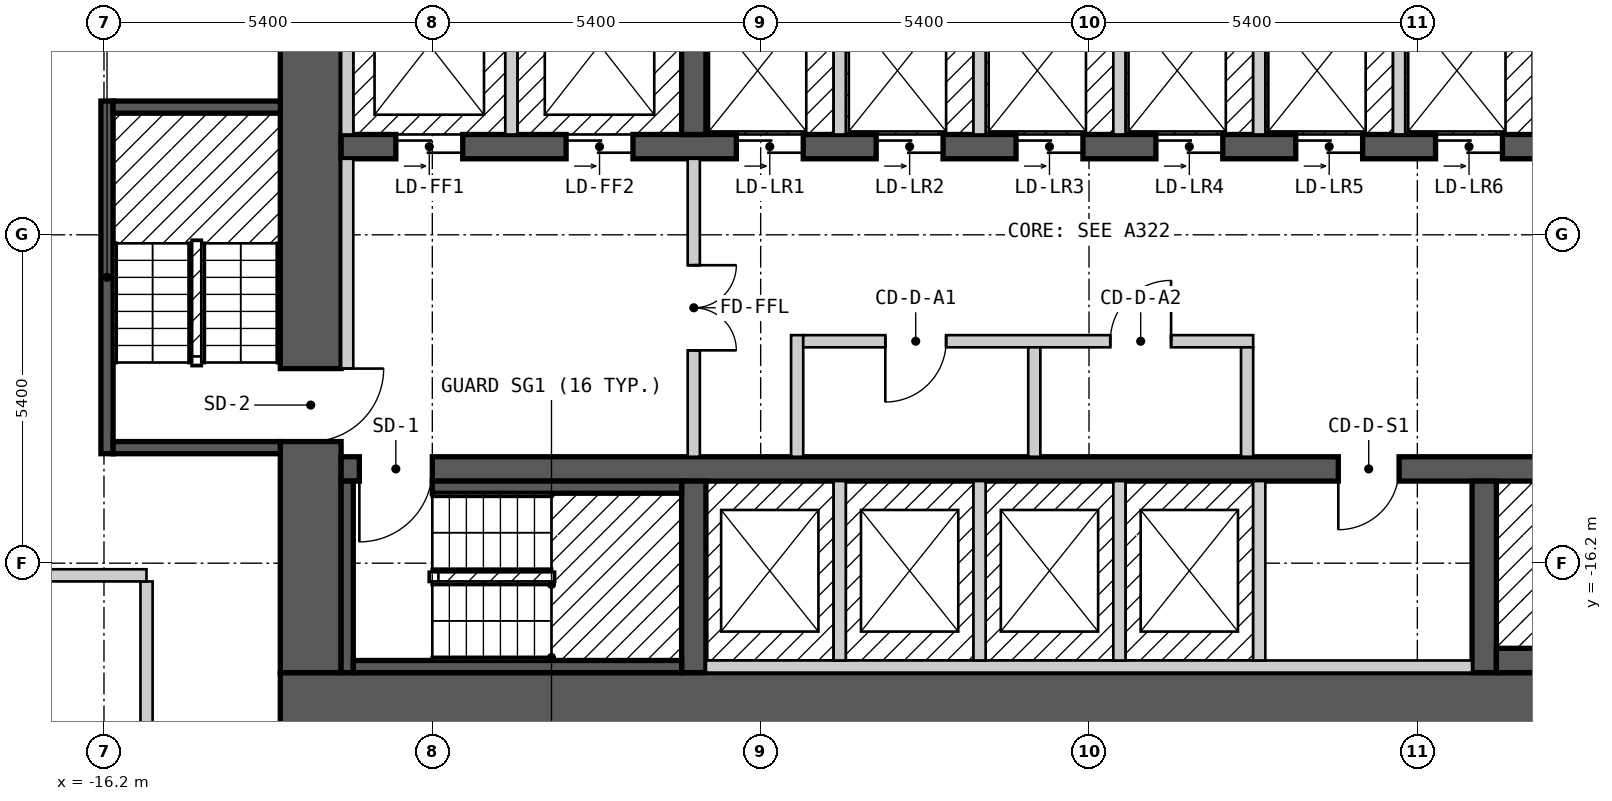
"""IFC4 building model, lengths in metres.
Left out: names, types, materials, properties, quantities, classifications, styles, units other than length and angle.
Written with IfcOpenShell. Run it as: python <this file> out.ifc"""

import sys

from ifc_helpers import new_model, si_unit, direction, frame, frame_2d, origin, place, context, subcontext, project, spatial, rectangle, extrude, element, fill, save


model = new_model("IFC4")
c1 = context("Model", 3, precision=1e-05, world=origin(), true_north=direction((0.0, 1.0)))
c2 = subcontext(c1, "Body", "Model", "MODEL_VIEW")
j1 = project(units=[si_unit("LENGTHUNIT", "METRE"), si_unit("PLANEANGLEUNIT", "RADIAN")], contexts=[c1])
p1 = place(None, origin())
s1 = spatial("IfcSite", under=j1, at=p1, CompositionType="ELEMENT")
p2 = place(p1, origin())
s2 = spatial("IfcBuilding", under=s1, at=p2, CompositionType="ELEMENT")
p3 = place(p2, frame((0.0, 0.0, 72.0)))
s3 = spatial("IfcBuildingStorey", under=s2, at=p3, CompositionType="ELEMENT", Elevation=72.0)
p4 = place(p3, frame((-13.3, -18.5, 0.0), z_axis=(0.0, 0.0, 1.0), x_axis=(1.0, 0.0, 0.0)))
e1 = element("IfcWall", 1, at=p4, inside=s3, PredefinedType="SHEAR", context=c2, shape_type="SweptSolid", body=[
    extrude(rectangle(XDim=26.6, YDim=1.0, at=frame_2d((13.3, 0.0))), origin(), (0.0, 0.0, 1.0), 2.7),
])
p5 = place(p3, frame((-12.8, -18.0, 0.0), z_axis=(0.0, 0.0, 1.0), x_axis=(0.0, 1.0, 0.0)))
e2 = element("IfcWall", 2, at=p5, inside=s3, PredefinedType="SHEAR", context=c2, shape_type="SweptSolid", body=[
    extrude(rectangle(XDim=12.0, YDim=1.0, at=frame_2d((6.0, 0.0))), origin(), (0.0, 0.0, 1.0), 2.7),
])
p6 = place(p5, frame((3.8, 0.0, 0.0)))
e3 = element("IfcOpeningElement", 3, at=p6, cuts=e2, PredefinedType="OPENING", context=c2, shape_type="SweptSolid", body=[
    extrude(rectangle(XDim=1.2, YDim=2.1, at=frame_2d((0.6, 1.05))), frame((0.0, 0.51, 0.0), z_axis=(0.0, -1.0, 0.0), x_axis=(1.0, 0.0, 0.0)), (0.0, 0.0, 1.0), 1.02),
])
p7 = place(p3, frame((-12.3, -14.65, 0.0), z_axis=(0.0, 0.0, 1.0), x_axis=(1.0, 0.0, 0.0)))
e4 = element("IfcWall", 4, at=p7, inside=s3, PredefinedType="SHEAR", context=c2, shape_type="SweptSolid", body=[
    extrude(rectangle(XDim=24.6, YDim=0.4, at=frame_2d((12.3, 0.0))), origin(), (0.0, 0.0, 1.0), 2.7),
])
p8 = place(p7, frame((1.5, 0.0, 0.0), z_axis=(0.0, 0.0, 1.0), x_axis=(-1.0, 0.0, 0.0)))
e5 = element("IfcOpeningElement", 5, at=p8, cuts=e4, PredefinedType="OPENING", context=c2, shape_type="SweptSolid", body=[
    extrude(rectangle(XDim=1.2, YDim=2.1, at=frame_2d((0.6, 1.05))), frame((0.0, 0.21, 0.0), z_axis=(0.0, -1.0, 0.0), x_axis=(1.0, 0.0, 0.0)), (0.0, 0.0, 1.0), 0.42),
])
p9 = place(p7, frame((24.35, 0.0, 0.0), z_axis=(0.0, 0.0, 1.0), x_axis=(-1.0, 0.0, 0.0)))
e6 = element("IfcOpeningElement", 6, at=p9, cuts=e4, PredefinedType="OPENING", context=c2, shape_type="SweptSolid", body=[
    extrude(rectangle(XDim=1.2, YDim=2.1, at=frame_2d((0.6, 1.05))), frame((0.0, 0.21, 0.0), z_axis=(0.0, -1.0, 0.0), x_axis=(1.0, 0.0, 0.0)), (0.0, 0.0, 1.0), 0.42),
])
p10 = place(p7, frame((17.4, 0.0, 0.0), z_axis=(0.0, 0.0, 1.0), x_axis=(-1.0, 0.0, 0.0)))
e7 = element("IfcOpeningElement", 7, at=p10, cuts=e4, PredefinedType="OPENING", context=c2, shape_type="SweptSolid", body=[
    extrude(rectangle(XDim=1.0, YDim=2.1, at=frame_2d((0.5, 1.05))), frame((0.0, 0.21, 0.0), z_axis=(0.0, -1.0, 0.0), x_axis=(1.0, 0.0, 0.0)), (0.0, 0.0, 1.0), 0.42),
])
p11 = place(p3, frame((-12.3, -9.35, 0.0), z_axis=(0.0, 0.0, 1.0), x_axis=(1.0, 0.0, 0.0)))
e8 = element("IfcWall", 8, at=p11, inside=s3, PredefinedType="SHEAR", context=c2, shape_type="SweptSolid", body=[
    extrude(rectangle(XDim=22.5, YDim=0.4, at=frame_2d((11.25, 0.0))), origin(), (0.0, 0.0, 1.0), 2.7),
])
p12 = place(p11, frame((0.9, 0.0, 0.0)))
e9 = element("IfcOpeningElement", 9, at=p12, cuts=e8, PredefinedType="OPENING", context=c2, shape_type="SweptSolid", body=[
    extrude(rectangle(XDim=1.1, YDim=2.1, at=frame_2d((0.55, 1.05))), frame((0.0, 0.21, 0.0), z_axis=(0.0, -1.0, 0.0), x_axis=(1.0, 0.0, 0.0)), (0.0, 0.0, 1.0), 0.42),
])
p13 = place(p11, frame((3.7, 0.0, 0.0)))
e10 = element("IfcOpeningElement", 10, at=p13, cuts=e8, PredefinedType="OPENING", context=c2, shape_type="SweptSolid", body=[
    extrude(rectangle(XDim=1.1, YDim=2.1, at=frame_2d((0.55, 1.05))), frame((0.0, 0.21, 0.0), z_axis=(0.0, -1.0, 0.0), x_axis=(1.0, 0.0, 0.0)), (0.0, 0.0, 1.0), 0.42),
])
p14 = place(p11, frame((6.5, 0.0, 0.0)))
e11 = element("IfcOpeningElement", 11, at=p14, cuts=e8, PredefinedType="OPENING", context=c2, shape_type="SweptSolid", body=[
    extrude(rectangle(XDim=1.1, YDim=2.1, at=frame_2d((0.55, 1.05))), frame((0.0, 0.21, 0.0), z_axis=(0.0, -1.0, 0.0), x_axis=(1.0, 0.0, 0.0)), (0.0, 0.0, 1.0), 0.42),
])
p15 = place(p11, frame((8.8, 0.0, 0.0)))
e12 = element("IfcOpeningElement", 12, at=p15, cuts=e8, PredefinedType="OPENING", context=c2, shape_type="SweptSolid", body=[
    extrude(rectangle(XDim=1.1, YDim=2.1, at=frame_2d((0.55, 1.05))), frame((0.0, 0.21, 0.0), z_axis=(0.0, -1.0, 0.0), x_axis=(1.0, 0.0, 0.0)), (0.0, 0.0, 1.0), 0.42),
])
p16 = place(p11, frame((11.1, 0.0, 0.0)))
e13 = element("IfcOpeningElement", 13, at=p16, cuts=e8, PredefinedType="OPENING", context=c2, shape_type="SweptSolid", body=[
    extrude(rectangle(XDim=1.1, YDim=2.1, at=frame_2d((0.55, 1.05))), frame((0.0, 0.21, 0.0), z_axis=(0.0, -1.0, 0.0), x_axis=(1.0, 0.0, 0.0)), (0.0, 0.0, 1.0), 0.42),
])
p17 = place(p11, frame((13.4, 0.0, 0.0)))
e14 = element("IfcOpeningElement", 14, at=p17, cuts=e8, PredefinedType="OPENING", context=c2, shape_type="SweptSolid", body=[
    extrude(rectangle(XDim=1.1, YDim=2.1, at=frame_2d((0.55, 1.05))), frame((0.0, 0.21, 0.0), z_axis=(0.0, -1.0, 0.0), x_axis=(1.0, 0.0, 0.0)), (0.0, 0.0, 1.0), 0.42),
])
p18 = place(p11, frame((15.7, 0.0, 0.0)))
e15 = element("IfcOpeningElement", 15, at=p18, cuts=e8, PredefinedType="OPENING", context=c2, shape_type="SweptSolid", body=[
    extrude(rectangle(XDim=1.1, YDim=2.1, at=frame_2d((0.55, 1.05))), frame((0.0, 0.21, 0.0), z_axis=(0.0, -1.0, 0.0), x_axis=(1.0, 0.0, 0.0)), (0.0, 0.0, 1.0), 0.42),
])
p19 = place(p11, frame((18.0, 0.0, 0.0)))
e16 = element("IfcOpeningElement", 16, at=p19, cuts=e8, PredefinedType="OPENING", context=c2, shape_type="SweptSolid", body=[
    extrude(rectangle(XDim=1.1, YDim=2.1, at=frame_2d((0.55, 1.05))), frame((0.0, 0.21, 0.0), z_axis=(0.0, -1.0, 0.0), x_axis=(1.0, 0.0, 0.0)), (0.0, 0.0, 1.0), 0.42),
])
p20 = place(p11, frame((20.4, 0.0, 0.0)))
e17 = element("IfcOpeningElement", 17, at=p20, cuts=e8, PredefinedType="OPENING", context=c2, shape_type="SweptSolid", body=[
    extrude(rectangle(XDim=1.1, YDim=2.1, at=frame_2d((0.55, 1.05))), frame((0.0, 0.21, 0.0), z_axis=(0.0, -1.0, 0.0), x_axis=(1.0, 0.0, 0.0)), (0.0, 0.0, 1.0), 0.42),
])
for number, where, z_axis, x_axis in (
    (18, (-6.5, -18.0, 0.0), (0.0, 0.0, 1.0), (0.0, 1.0, 0.0)),
    (19, (6.5, -18.0, 0.0), (0.0, 0.0, 1.0), (0.0, 1.0, 0.0)),
    (20, (-6.5, -9.15, 0.0), (0.0, 0.0, 1.0), (0.0, 1.0, 0.0)),
):
    element("IfcWall", number, at=place(p3, frame(where, z_axis=z_axis, x_axis=x_axis)), inside=s3, PredefinedType="SHEAR", context=c2, shape_type="SweptSolid", body=[
        extrude(rectangle(XDim=3.15, YDim=0.4, at=frame_2d((1.575, 0.0))), origin(), (0.0, 0.0, 1.0), 2.7),
    ])
p21 = place(p3, frame((-15.5, -16.501, 0.0), z_axis=(0.0, 0.0, 1.0), x_axis=(0.0, -1.0, 0.0)))
e21 = element("IfcWall", 21, at=p21, inside=s3, PredefinedType="PARTITIONING", context=c2, shape_type="SweptSolid", body=[
    extrude(rectangle(XDim=4.598, YDim=0.2, at=frame_2d((2.299, 0.0))), origin(), (0.0, 0.0, 1.0), 2.7),
])
p22 = place(p3, frame((-18.249, -16.4, 0.0), z_axis=(0.0, 0.0, 1.0), x_axis=(1.0, 0.0, 0.0)))
e22 = element("IfcWall", 22, at=p22, inside=s3, PredefinedType="PARTITIONING", context=c2, shape_type="SweptSolid", body=[
    extrude(rectangle(XDim=2.748, YDim=0.2, at=frame_2d((1.374, 0.0))), origin(), (0.0, 0.0, 1.0), 2.7),
])
p23 = place(p3, frame((-16.15, -14.4, 0.0), z_axis=(0.0, 0.0, 1.0), x_axis=(0.0, 1.0, 0.0)))
e23 = element("IfcWall", 23, at=p23, inside=s3, PredefinedType="SOLIDWALL", context=c2, shape_type="SweptSolid", body=[
    extrude(rectangle(XDim=5.8, YDim=0.2, at=frame_2d((2.9, 0.0))), origin(), (0.0, 0.0, 1.0), 2.7),
])
for number, where, z_axis, x_axis in (
    (24, (-16.05, -14.3, 0.0), (0.0, 0.0, 1.0), (1.0, 0.0, 0.0)),
    (25, (-16.05, -8.7, 0.0), (0.0, 0.0, 1.0), (1.0, 0.0, 0.0)),
):
    element("IfcWall", number, at=place(p3, frame(where, z_axis=z_axis, x_axis=x_axis)), inside=s3, PredefinedType="SOLIDWALL", context=c2, shape_type="SweptSolid", body=[
        extrude(rectangle(XDim=2.75, YDim=0.2, at=frame_2d((1.375, 0.0))), origin(), (0.0, 0.0, 1.0), 2.7),
    ])
p24 = place(p3, frame((-12.2, -18.0, 0.0), z_axis=(0.0, 0.0, 1.0), x_axis=(0.0, 1.0, 0.0)))
e26 = element("IfcWall", 26, at=p24, inside=s3, PredefinedType="SOLIDWALL", context=c2, shape_type="SweptSolid", body=[
    extrude(rectangle(XDim=3.15, YDim=0.2, at=frame_2d((1.575, 0.0))), origin(), (0.0, 0.0, 1.0), 2.7),
])
p25 = place(p3, frame((-12.2, -13.0, 0.0), z_axis=(0.0, 0.0, 1.0), x_axis=(0.0, 1.0, 0.0)))
e27 = element("IfcWall", 27, at=p25, inside=s3, PredefinedType="PARTITIONING", context=c2, shape_type="SweptSolid", body=[
    extrude(rectangle(XDim=3.45, YDim=0.2, at=frame_2d((1.725, 0.0))), origin(), (0.0, 0.0, 1.0), 2.7),
])
p26 = place(p3, frame((-12.2, -9.15, 0.0), z_axis=(0.0, 0.0, 1.0), x_axis=(0.0, 1.0, 0.0)))
e28 = element("IfcWall", 28, at=p26, inside=s3, PredefinedType="SOLIDWALL", context=c2, shape_type="SweptSolid", body=[
    extrude(rectangle(XDim=3.15, YDim=0.2, at=frame_2d((1.575, 0.0))), origin(), (0.0, 0.0, 1.0), 2.7),
])
p27 = place(p3, frame((-12.1, -17.9, 0.0), z_axis=(0.0, 0.0, 1.0), x_axis=(1.0, 0.0, 0.0)))
e29 = element("IfcWall", 29, at=p27, inside=s3, PredefinedType="SOLIDWALL", context=c2, shape_type="SweptSolid", body=[
    extrude(rectangle(XDim=5.4, YDim=0.2, at=frame_2d((2.7, 0.0))), origin(), (0.0, 0.0, 1.0), 2.7),
])
p28 = place(p3, frame((-10.8, -14.95, 0.0), z_axis=(0.0, 0.0, 1.0), x_axis=(1.0, 0.0, 0.0)))
e30 = element("IfcWall", 30, at=p28, inside=s3, PredefinedType="SOLIDWALL", context=c2, shape_type="SweptSolid", body=[
    extrude(rectangle(XDim=4.1, YDim=0.2, at=frame_2d((2.05, 0.0))), origin(), (0.0, 0.0, 1.0), 2.7),
])
p29 = place(p3, frame((-9.5, -9.15, 0.0), z_axis=(0.0, 0.0, 1.0), x_axis=(0.0, 1.0, 0.0)))
e31 = element("IfcWall", 31, at=p29, inside=s3, PredefinedType="SOLIDWALL", context=c2, shape_type="SweptSolid", body=[
    extrude(rectangle(XDim=2.95, YDim=0.2, at=frame_2d((1.475, 0.0))), origin(), (0.0, 0.0, 1.0), 2.7),
])
p30 = place(p3, frame((-6.5, -14.45, 0.0), z_axis=(0.0, 0.0, 1.0), x_axis=(0.0, 1.0, 0.0)))
e32 = element("IfcWall", 32, at=p30, inside=s3, PredefinedType="PARTITIONING", context=c2, shape_type="SweptSolid", body=[
    extrude(rectangle(XDim=4.9, YDim=0.2, at=frame_2d((2.45, 0.0))), origin(), (0.0, 0.0, 1.0), 2.7),
])
p31 = place(p30, frame((3.15, 0.0, 0.0), z_axis=(0.0, 0.0, 1.0), x_axis=(-1.0, 0.0, 0.0)))
e33 = element("IfcOpeningElement", 33, at=p31, cuts=e32, PredefinedType="OPENING", context=c2, shape_type="SweptSolid", body=[
    extrude(rectangle(XDim=1.4, YDim=2.1, at=frame_2d((0.7, 1.05))), frame((0.0, 0.11, 0.0), z_axis=(0.0, -1.0, 0.0), x_axis=(1.0, 0.0, 0.0)), (0.0, 0.0, 1.0), 0.22),
])
p32 = place(p3, frame((-6.3, -17.9, 0.0), z_axis=(0.0, 0.0, 1.0), x_axis=(1.0, 0.0, 0.0)))
e34 = element("IfcWall", 34, at=p32, inside=s3, PredefinedType="SOLIDWALL", context=c2, shape_type="SweptSolid", body=[
    extrude(rectangle(XDim=12.6, YDim=0.2, at=frame_2d((6.3, 0.0))), origin(), (0.0, 0.0, 1.0), 2.7),
])
p33 = place(p3, frame((-4.8, -14.45, 0.0), z_axis=(0.0, 0.0, 1.0), x_axis=(0.0, 1.0, 0.0)))
e35 = element("IfcWall", 35, at=p33, inside=s3, PredefinedType="PARTITIONING", context=c2, shape_type="SweptSolid", body=[
    extrude(rectangle(XDim=2.0, YDim=0.2, at=frame_2d((1.0, 0.0))), origin(), (0.0, 0.0, 1.0), 2.7),
])
p34 = place(p3, frame((-4.7, -12.55, 0.0), z_axis=(0.0, 0.0, 1.0), x_axis=(1.0, 0.0, 0.0)))
e36 = element("IfcWall", 36, at=p34, inside=s3, PredefinedType="PARTITIONING", context=c2, shape_type="SweptSolid", body=[
    extrude(rectangle(XDim=7.4, YDim=0.2, at=frame_2d((3.7, 0.0))), origin(), (0.0, 0.0, 1.0), 2.7),
])
p35 = place(p34, frame((2.35, 0.0, 0.0), z_axis=(0.0, 0.0, 1.0), x_axis=(-1.0, 0.0, 0.0)))
e37 = element("IfcOpeningElement", 37, at=p35, cuts=e36, PredefinedType="OPENING", context=c2, shape_type="SweptSolid", body=[
    extrude(rectangle(XDim=1.0, YDim=2.1, at=frame_2d((0.5, 1.05))), frame((0.0, 0.11, 0.0), z_axis=(0.0, -1.0, 0.0), x_axis=(1.0, 0.0, 0.0)), (0.0, 0.0, 1.0), 0.22),
])
p36 = place(p34, frame((6.05, 0.0, 0.0), z_axis=(0.0, 0.0, 1.0), x_axis=(-1.0, 0.0, 0.0)))
e38 = element("IfcOpeningElement", 38, at=p36, cuts=e36, PredefinedType="OPENING", context=c2, shape_type="SweptSolid", body=[
    extrude(rectangle(XDim=1.0, YDim=2.1, at=frame_2d((0.5, 1.05))), frame((0.0, 0.11, 0.0), z_axis=(0.0, -1.0, 0.0), x_axis=(1.0, 0.0, 0.0)), (0.0, 0.0, 1.0), 0.22),
])
for number, where, z_axis, x_axis in (
    (39, (-4.1, -17.8, 0.0), (0.0, 0.0, 1.0), (0.0, 1.0, 0.0)),
    (40, (-4.1, -9.15, 0.0), (0.0, 0.0, 1.0), (0.0, 1.0, 0.0)),
    (41, (-1.8, -17.8, 0.0), (0.0, 0.0, 1.0), (0.0, 1.0, 0.0)),
    (42, (-1.8, -9.15, 0.0), (0.0, 0.0, 1.0), (0.0, 1.0, 0.0)),
):
    element("IfcWall", number, at=place(p3, frame(where, z_axis=z_axis, x_axis=x_axis)), inside=s3, PredefinedType="SOLIDWALL", context=c2, shape_type="SweptSolid", body=[
        extrude(rectangle(XDim=2.95, YDim=0.2, at=frame_2d((1.475, 0.0))), origin(), (0.0, 0.0, 1.0), 2.7),
    ])
p37 = place(p3, frame((-0.9, -14.45, 0.0), z_axis=(0.0, 0.0, 1.0), x_axis=(0.0, 1.0, 0.0)))
e43 = element("IfcWall", 43, at=p37, inside=s3, PredefinedType="PARTITIONING", context=c2, shape_type="SweptSolid", body=[
    extrude(rectangle(XDim=1.8, YDim=0.2, at=frame_2d((0.9, 0.0))), origin(), (0.0, 0.0, 1.0), 2.7),
])
for number, where, z_axis, x_axis in (
    (44, (0.5, -17.8, 0.0), (0.0, 0.0, 1.0), (0.0, 1.0, 0.0)),
    (45, (0.5, -9.15, 0.0), (0.0, 0.0, 1.0), (0.0, 1.0, 0.0)),
):
    element("IfcWall", number, at=place(p3, frame(where, z_axis=z_axis, x_axis=x_axis)), inside=s3, PredefinedType="SOLIDWALL", context=c2, shape_type="SweptSolid", body=[
        extrude(rectangle(XDim=2.95, YDim=0.2, at=frame_2d((1.475, 0.0))), origin(), (0.0, 0.0, 1.0), 2.7),
    ])
p38 = place(p3, frame((2.6, -14.45, 0.0), z_axis=(0.0, 0.0, 1.0), x_axis=(0.0, 1.0, 0.0)))
e46 = element("IfcWall", 46, at=p38, inside=s3, PredefinedType="PARTITIONING", context=c2, shape_type="SweptSolid", body=[
    extrude(rectangle(XDim=1.8, YDim=0.2, at=frame_2d((0.9, 0.0))), origin(), (0.0, 0.0, 1.0), 2.7),
])
for number, where, z_axis, x_axis in (
    (47, (2.8, -17.8, 0.0), (0.0, 0.0, 1.0), (0.0, 1.0, 0.0)),
    (48, (2.8, -9.15, 0.0), (0.0, 0.0, 1.0), (0.0, 1.0, 0.0)),
    (49, (5.1, -9.15, 0.0), (0.0, 0.0, 1.0), (0.0, 1.0, 0.0)),
):
    element("IfcWall", number, at=place(p3, frame(where, z_axis=z_axis, x_axis=x_axis)), inside=s3, PredefinedType="SOLIDWALL", context=c2, shape_type="SweptSolid", body=[
        extrude(rectangle(XDim=2.95, YDim=0.2, at=frame_2d((1.475, 0.0))), origin(), (0.0, 0.0, 1.0), 2.7),
    ])
p39 = place(p3, frame((6.7, -17.8, 0.0), z_axis=(0.0, 0.0, 1.0), x_axis=(1.0, 0.0, 0.0)))
e50 = element("IfcWall", 50, at=p39, inside=s3, PredefinedType="SOLIDWALL", context=c2, shape_type="SweptSolid", body=[
    extrude(rectangle(XDim=5.6, YDim=0.4, at=frame_2d((2.8, 0.0))), origin(), (0.0, 0.0, 1.0), 2.7),
])
p40 = place(p3, frame((7.4, -9.15, 0.0), z_axis=(0.0, 0.0, 1.0), x_axis=(0.0, 1.0, 0.0)))
e51 = element("IfcWall", 51, at=p40, inside=s3, PredefinedType="SOLIDWALL", context=c2, shape_type="SweptSolid", body=[
    extrude(rectangle(XDim=2.95, YDim=0.2, at=frame_2d((1.475, 0.0))), origin(), (0.0, 0.0, 1.0), 2.7),
])
p41 = place(p12, origin())
e52 = element("IfcDoor", 52, at=p41, inside=s3, OperationType="DOUBLE_DOOR_SLIDING", PredefinedType="DOOR", context=c2, shape_type="SweptSolid", body=[
    extrude(rectangle(XDim=1.1, YDim=2.1, at=frame_2d((0.55, 1.05))), frame((0.0, 0.025, 0.0), z_axis=(0.0, -1.0, 0.0), x_axis=(1.0, 0.0, 0.0)), (0.0, 0.0, 1.0), 0.05),
])
fill(e9, e52)
p42 = place(p13, origin())
e53 = element("IfcDoor", 53, at=p42, inside=s3, OperationType="DOUBLE_DOOR_SLIDING", PredefinedType="DOOR", context=c2, shape_type="SweptSolid", body=[
    extrude(rectangle(XDim=1.1, YDim=2.1, at=frame_2d((0.55, 1.05))), frame((0.0, 0.025, 0.0), z_axis=(0.0, -1.0, 0.0), x_axis=(1.0, 0.0, 0.0)), (0.0, 0.0, 1.0), 0.05),
])
fill(e10, e53)
p43 = place(p14, origin())
e54 = element("IfcDoor", 54, at=p43, inside=s3, OperationType="DOUBLE_DOOR_SLIDING", PredefinedType="DOOR", context=c2, shape_type="SweptSolid", body=[
    extrude(rectangle(XDim=1.1, YDim=2.1, at=frame_2d((0.55, 1.05))), frame((0.0, 0.025, 0.0), z_axis=(0.0, -1.0, 0.0), x_axis=(1.0, 0.0, 0.0)), (0.0, 0.0, 1.0), 0.05),
])
fill(e11, e54)
p44 = place(p15, origin())
e55 = element("IfcDoor", 55, at=p44, inside=s3, OperationType="DOUBLE_DOOR_SLIDING", PredefinedType="DOOR", context=c2, shape_type="SweptSolid", body=[
    extrude(rectangle(XDim=1.1, YDim=2.1, at=frame_2d((0.55, 1.05))), frame((0.0, 0.025, 0.0), z_axis=(0.0, -1.0, 0.0), x_axis=(1.0, 0.0, 0.0)), (0.0, 0.0, 1.0), 0.05),
])
fill(e12, e55)
p45 = place(p16, origin())
e56 = element("IfcDoor", 56, at=p45, inside=s3, OperationType="DOUBLE_DOOR_SLIDING", PredefinedType="DOOR", context=c2, shape_type="SweptSolid", body=[
    extrude(rectangle(XDim=1.1, YDim=2.1, at=frame_2d((0.55, 1.05))), frame((0.0, 0.025, 0.0), z_axis=(0.0, -1.0, 0.0), x_axis=(1.0, 0.0, 0.0)), (0.0, 0.0, 1.0), 0.05),
])
fill(e13, e56)
p46 = place(p17, origin())
e57 = element("IfcDoor", 57, at=p46, inside=s3, OperationType="DOUBLE_DOOR_SLIDING", PredefinedType="DOOR", context=c2, shape_type="SweptSolid", body=[
    extrude(rectangle(XDim=1.1, YDim=2.1, at=frame_2d((0.55, 1.05))), frame((0.0, 0.025, 0.0), z_axis=(0.0, -1.0, 0.0), x_axis=(1.0, 0.0, 0.0)), (0.0, 0.0, 1.0), 0.05),
])
fill(e14, e57)
p47 = place(p18, origin())
e58 = element("IfcDoor", 58, at=p47, inside=s3, OperationType="DOUBLE_DOOR_SLIDING", PredefinedType="DOOR", context=c2, shape_type="SweptSolid", body=[
    extrude(rectangle(XDim=1.1, YDim=2.1, at=frame_2d((0.55, 1.05))), frame((0.0, 0.025, 0.0), z_axis=(0.0, -1.0, 0.0), x_axis=(1.0, 0.0, 0.0)), (0.0, 0.0, 1.0), 0.05),
])
fill(e15, e58)
p48 = place(p19, origin())
e59 = element("IfcDoor", 59, at=p48, inside=s3, OperationType="DOUBLE_DOOR_SLIDING", PredefinedType="DOOR", context=c2, shape_type="SweptSolid", body=[
    extrude(rectangle(XDim=1.1, YDim=2.1, at=frame_2d((0.55, 1.05))), frame((0.0, 0.025, 0.0), z_axis=(0.0, -1.0, 0.0), x_axis=(1.0, 0.0, 0.0)), (0.0, 0.0, 1.0), 0.05),
])
fill(e16, e59)
p49 = place(p8, origin())
e60 = element("IfcDoor", 60, at=p49, inside=s3, OperationType="SINGLE_SWING_RIGHT", PredefinedType="DOOR", context=c2, shape_type="SweptSolid", body=[
    extrude(rectangle(XDim=1.2, YDim=2.1, at=frame_2d((0.6, 1.05))), frame((0.0, 0.025, 0.0), z_axis=(0.0, -1.0, 0.0), x_axis=(1.0, 0.0, 0.0)), (0.0, 0.0, 1.0), 0.05),
])
fill(e5, e60)
p50 = place(p6, origin())
e61 = element("IfcDoor", 61, at=p50, inside=s3, OperationType="SINGLE_SWING_RIGHT", PredefinedType="DOOR", context=c2, shape_type="SweptSolid", body=[
    extrude(rectangle(XDim=1.2, YDim=2.1, at=frame_2d((0.6, 1.05))), frame((0.0, 0.025, 0.0), z_axis=(0.0, -1.0, 0.0), x_axis=(1.0, 0.0, 0.0)), (0.0, 0.0, 1.0), 0.05),
])
fill(e3, e61)
p51 = place(p31, origin())
e62 = element("IfcDoor", 62, at=p51, inside=s3, OperationType="DOUBLE_DOOR_SINGLE_SWING", PredefinedType="DOOR", context=c2, shape_type="SweptSolid", body=[
    extrude(rectangle(XDim=1.4, YDim=2.1, at=frame_2d((0.7, 1.05))), frame((0.0, 0.025, 0.0), z_axis=(0.0, -1.0, 0.0), x_axis=(1.0, 0.0, 0.0)), (0.0, 0.0, 1.0), 0.05),
])
fill(e33, e62)
p52 = place(p35, origin())
e63 = element("IfcDoor", 63, at=p52, inside=s3, OperationType="SINGLE_SWING_RIGHT", PredefinedType="DOOR", context=c2, shape_type="SweptSolid", body=[
    extrude(rectangle(XDim=1.0, YDim=2.1, at=frame_2d((0.5, 1.05))), frame((0.0, 0.025, 0.0), z_axis=(0.0, -1.0, 0.0), x_axis=(1.0, 0.0, 0.0)), (0.0, 0.0, 1.0), 0.05),
])
fill(e37, e63)
p53 = place(p36, origin())
e64 = element("IfcDoor", 64, at=p53, inside=s3, OperationType="SINGLE_SWING_LEFT", PredefinedType="DOOR", context=c2, shape_type="SweptSolid", body=[
    extrude(rectangle(XDim=1.0, YDim=2.1, at=frame_2d((0.5, 1.05))), frame((0.0, 0.025, 0.0), z_axis=(0.0, -1.0, 0.0), x_axis=(1.0, 0.0, 0.0)), (0.0, 0.0, 1.0), 0.05),
])
fill(e38, e64)
p54 = place(p10, origin())
e65 = element("IfcDoor", 65, at=p54, inside=s3, OperationType="SINGLE_SWING_RIGHT", PredefinedType="DOOR", context=c2, shape_type="SweptSolid", body=[
    extrude(rectangle(XDim=1.0, YDim=2.1, at=frame_2d((0.5, 1.05))), frame((0.0, 0.025, 0.0), z_axis=(0.0, -1.0, 0.0), x_axis=(1.0, 0.0, 0.0)), (0.0, 0.0, 1.0), 0.05),
])
fill(e7, e65)
save(model, sys.argv[1])
